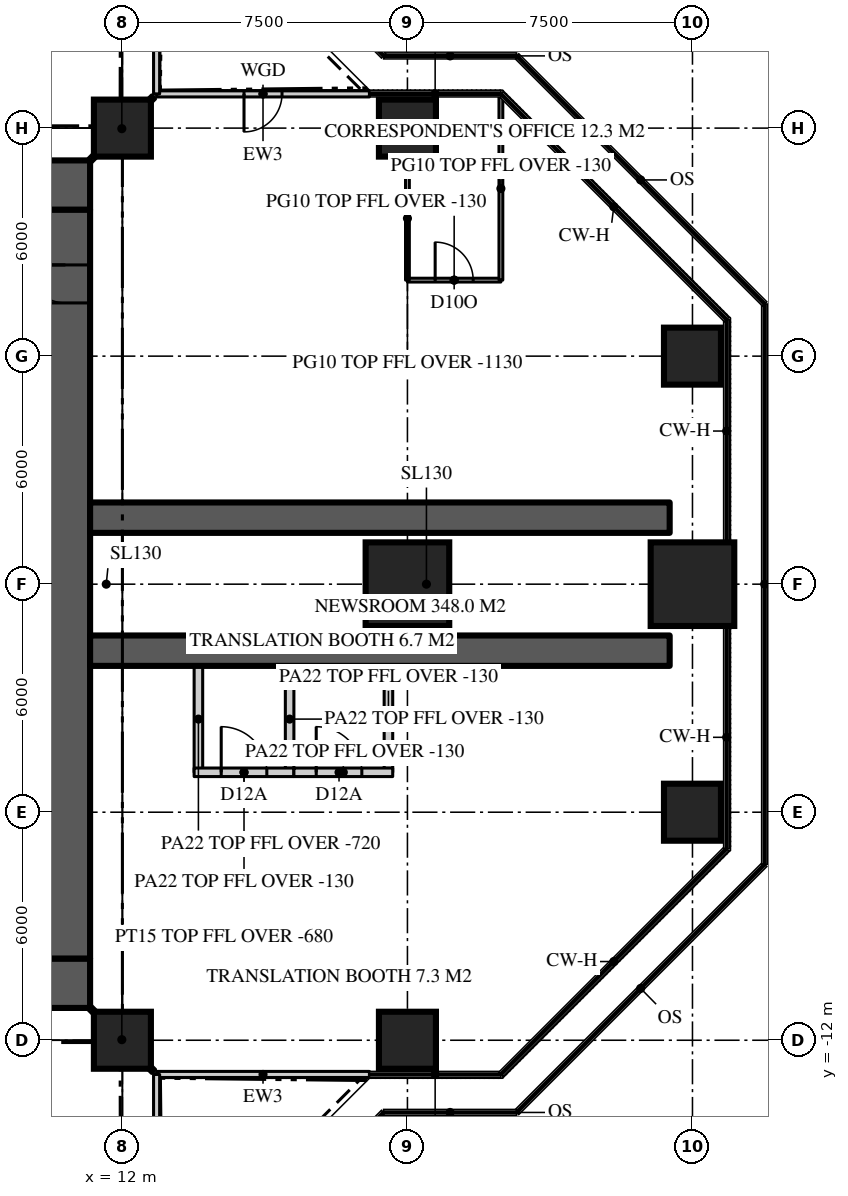
"""IFC4 building model, lengths in metres.
Left out: names, types, materials, properties, quantities, classifications, styles, units other than length and angle.
Written with IfcOpenShell. Run it as: python <this file> out.ifc"""

import sys

from ifc_helpers import new_model, si_unit, direction, frame, frame_2d, origin, origin_2d, place, context, subcontext, project, spatial, rectangle, extrude, element, fill, save


model = new_model("IFC4")
c1 = context("Model", 3, precision=1e-05, world=origin(), true_north=direction((0.0, 1.0)))
c2 = subcontext(c1, "Body", "Model", "MODEL_VIEW")
j1 = project(units=[si_unit("LENGTHUNIT", "METRE"), si_unit("PLANEANGLEUNIT", "RADIAN")], contexts=[c1])
p1 = place(None, origin())
s1 = spatial("IfcSite", under=j1, at=p1, CompositionType="ELEMENT")
p2 = place(p1, origin())
s2 = spatial("IfcBuilding", under=s1, at=p2, CompositionType="ELEMENT")
p3 = place(p2, frame((0.0, 0.0, 243.9)))
s3 = spatial("IfcBuildingStorey", under=s2, at=p3, CompositionType="ELEMENT", Elevation=243.9)
p4 = place(p3, frame((-11.15, 10.5, 0.0), z_axis=(0.0, 0.0, 1.0), x_axis=(1.0, 0.0, 0.0)))
e1 = element("IfcWall", 1, at=p4, inside=s3, PredefinedType="SHEAR", context=c2, shape_type="SweptSolid", body=[
    extrude(rectangle(XDim=22.3, YDim=1.3, at=frame_2d((11.15, 0.0))), origin(), (0.0, 0.0, 1.0), 3.9),
])
p5 = place(p4, frame((4.25, 0.0, 0.0)))
e2 = element("IfcOpeningElement", 2, at=p5, cuts=e1, PredefinedType="OPENING", context=c2, shape_type="SweptSolid", body=[
    extrude(rectangle(XDim=1.8, YDim=2.2, at=frame_2d((0.9, 1.1))), frame((0.0, 0.66, 0.0), z_axis=(0.0, -1.0, 0.0), x_axis=(1.0, 0.0, 0.0)), (0.0, 0.0, 1.0), 1.32),
])
p6 = place(p4, frame((16.25, 0.0, 0.0)))
e3 = element("IfcOpeningElement", 3, at=p6, cuts=e1, PredefinedType="OPENING", context=c2, shape_type="SweptSolid", body=[
    extrude(rectangle(XDim=1.8, YDim=2.2, at=frame_2d((0.9, 1.1))), frame((0.0, 0.66, 0.0), z_axis=(0.0, -1.0, 0.0), x_axis=(1.0, 0.0, 0.0)), (0.0, 0.0, 1.0), 1.32),
])
p7 = place(p3, frame((11.15, -10.5, 0.0), z_axis=(0.0, 0.0, 1.0), x_axis=(-1.0, 0.0, 0.0)))
e4 = element("IfcWall", 4, at=p7, inside=s3, PredefinedType="SHEAR", context=c2, shape_type="SweptSolid", body=[
    extrude(rectangle(XDim=22.3, YDim=1.3, at=frame_2d((11.15, 0.0))), origin(), (0.0, 0.0, 1.0), 3.9),
])
p8 = place(p7, frame((16.25, 0.0, 0.0)))
e5 = element("IfcOpeningElement", 5, at=p8, cuts=e4, PredefinedType="OPENING", context=c2, shape_type="SweptSolid", body=[
    extrude(rectangle(XDim=1.8, YDim=2.2, at=frame_2d((0.9, 1.1))), frame((0.0, 0.66, 0.0), z_axis=(0.0, -1.0, 0.0), x_axis=(1.0, 0.0, 0.0)), (0.0, 0.0, 1.0), 1.32),
])
p9 = place(p7, frame((4.25, 0.0, 0.0)))
e6 = element("IfcOpeningElement", 6, at=p9, cuts=e4, PredefinedType="OPENING", context=c2, shape_type="SweptSolid", body=[
    extrude(rectangle(XDim=1.8, YDim=2.2, at=frame_2d((0.9, 1.1))), frame((0.0, 0.66, 0.0), z_axis=(0.0, -1.0, 0.0), x_axis=(1.0, 0.0, 0.0)), (0.0, 0.0, 1.0), 1.32),
])
p10 = place(p3, frame((10.5, -9.85, 0.0), z_axis=(0.0, 0.0, 1.0), x_axis=(0.0, 1.0, 0.0)))
e7 = element("IfcWall", 7, at=p10, inside=s3, PredefinedType="SHEAR", context=c2, shape_type="SweptSolid", body=[
    extrude(rectangle(XDim=19.7, YDim=1.3, at=frame_2d((9.85, 0.0))), origin(), (0.0, 0.0, 1.0), 3.9),
])
p11 = place(p10, frame((17.25, 0.0, 0.0)))
e8 = element("IfcOpeningElement", 8, at=p11, cuts=e7, PredefinedType="OPENING", context=c2, shape_type="SweptSolid", body=[
    extrude(rectangle(XDim=1.0, YDim=2.2, at=frame_2d((0.5, 1.1))), frame((0.0, 0.66, 0.0), z_axis=(0.0, -1.0, 0.0), x_axis=(1.0, 0.0, 0.0)), (0.0, 0.0, 1.0), 1.32),
])
for number, where, z_axis, x_axis in (
    (9, (11.15, -1.75, 0.0), (0.0, 0.0, 1.0), (1.0, 0.0, 0.0)),
    (10, (11.15, 1.75, 0.0), (0.0, 0.0, 1.0), (1.0, 0.0, 0.0)),
):
    element("IfcWall", number, at=place(p3, frame(where, z_axis=z_axis, x_axis=x_axis)), inside=s3, PredefinedType="SHEAR", context=c2, shape_type="SweptSolid", body=[
        extrude(rectangle(XDim=15.25, YDim=0.8, at=frame_2d((7.625, 0.0))), origin(), (0.0, 0.0, 1.0), 3.9),
    ])
for number, where, z_axis, x_axis in (
    (11, (12.0, -12.0, 0.0), (0.0, 0.0, 1.0), (1.0, 0.0, 0.0)),
    (12, (19.5, -12.0, 0.0), (0.0, 0.0, 1.0), (1.0, 0.0, 0.0)),
    (13, (27.0, -6.0, 0.0), (0.0, 0.0, 1.0), (1.0, 0.0, 0.0)),
):
    element("IfcColumn", number, at=place(p3, frame(where, z_axis=z_axis, x_axis=x_axis)), inside=s3, PredefinedType="COLUMN", context=c2, shape_type="SweptSolid", body=[
        extrude(rectangle(XDim=1.5, YDim=1.5, at=origin_2d()), origin(), (0.0, 0.0, 1.0), 3.9),
    ])
for number, where, z_axis, x_axis in (
    (14, (19.5, 0.0, 0.0), (0.0, 0.0, 1.0), (1.0, 0.0, 0.0)),
    (15, (27.0, 0.0, 0.0), (0.0, 0.0, 1.0), (1.0, 0.0, 0.0)),
):
    element("IfcColumn", number, at=place(p3, frame(where, z_axis=z_axis, x_axis=x_axis)), inside=s3, PredefinedType="COLUMN", context=c2, shape_type="SweptSolid", body=[
        extrude(rectangle(XDim=2.2, YDim=2.2, at=origin_2d()), origin(), (0.0, 0.0, 1.0), 3.9),
    ])
for number, where, z_axis, x_axis in (
    (16, (27.0, 6.0, 0.0), (0.0, 0.0, 1.0), (1.0, 0.0, 0.0)),
    (17, (12.0, 12.0, 0.0), (0.0, 0.0, 1.0), (1.0, 0.0, 0.0)),
    (18, (19.5, 12.0, 0.0), (0.0, 0.0, 1.0), (1.0, 0.0, 0.0)),
):
    element("IfcColumn", number, at=place(p3, frame(where, z_axis=z_axis, x_axis=x_axis)), inside=s3, PredefinedType="COLUMN", context=c2, shape_type="SweptSolid", body=[
        extrude(rectangle(XDim=1.5, YDim=1.5, at=origin_2d()), origin(), (0.0, 0.0, 1.0), 3.9),
    ])
p12 = place(p3, frame((12.9, -12.9, 0.0), z_axis=(0.0, 0.0, 1.0), x_axis=(1.0, 0.0, 0.0)))
e19 = element("IfcWall", 19, at=p12, inside=s3, PredefinedType="SOLIDWALL", context=c2, shape_type="SweptSolid", body=[
    extrude(rectangle(XDim=5.6, YDim=0.16, at=frame_2d((2.8, 0.0))), origin(), (0.0, 0.0, 1.0), 3.77),
])
p13 = place(p3, frame((18.5, 12.9, 0.0), z_axis=(0.0, 0.0, 1.0), x_axis=(-1.0, 0.0, 0.0)))
e20 = element("IfcWall", 20, at=p13, inside=s3, PredefinedType="SOLIDWALL", context=c2, shape_type="SweptSolid", body=[
    extrude(rectangle(XDim=5.6, YDim=0.16, at=frame_2d((2.8, 0.0))), origin(), (0.0, 0.0, 1.0), 3.77),
])
p14 = place(p13, frame((2.3, 0.0, 0.0)))
e21 = element("IfcOpeningElement", 21, at=p14, cuts=e20, PredefinedType="OPENING", context=c2, shape_type="SweptSolid", body=[
    extrude(rectangle(XDim=1.0, YDim=2.2, at=frame_2d((0.5, 1.1))), frame((0.0, 0.09, 0.0), z_axis=(0.0, -1.0, 0.0), x_axis=(1.0, 0.0, 0.0)), (0.0, 0.0, 1.0), 0.18),
])
p15 = place(p3, frame((12.9, 12.9, 0.0), z_axis=(0.0, 0.0, 1.0), x_axis=(0.0, 1.0, 0.0)))
e22 = element("IfcWall", 22, at=p15, inside=s3, PredefinedType="SOLIDWALL", context=c2, shape_type="SweptSolid", body=[
    extrude(rectangle(XDim=5.6, YDim=0.16, at=frame_2d((2.8, 0.0))), origin(), (0.0, 0.0, 1.0), 3.77),
])
p16 = place(p3, frame((12.9, -18.5, 0.0), z_axis=(0.0, 0.0, 1.0), x_axis=(0.0, 1.0, 0.0)))
e23 = element("IfcWall", 23, at=p16, inside=s3, PredefinedType="SOLIDWALL", context=c2, shape_type="SweptSolid", body=[
    extrude(rectangle(XDim=5.6, YDim=0.16, at=frame_2d((2.8, 0.0))), origin(), (0.0, 0.0, 1.0), 3.77),
])
p17 = place(p16, frame((2.3, 0.0, 0.0)))
e24 = element("IfcOpeningElement", 24, at=p17, cuts=e23, PredefinedType="OPENING", context=c2, shape_type="SweptSolid", body=[
    extrude(rectangle(XDim=1.0, YDim=2.2, at=frame_2d((0.5, 1.1))), frame((0.0, 0.09, 0.0), z_axis=(0.0, -1.0, 0.0), x_axis=(1.0, 0.0, 0.0)), (0.0, 0.0, 1.0), 0.18),
])
p18 = place(p3, frame((19.5, 8.0, 0.0), z_axis=(0.0, 0.0, 1.0), x_axis=(1.0, 0.0, 0.0)))
e25 = element("IfcWall", 25, at=p18, inside=s3, PredefinedType="PARTITIONING", context=c2, shape_type="SweptSolid", body=[
    extrude(rectangle(XDim=2.459, YDim=0.1, at=frame_2d((1.229, 0.0))), origin(), (0.0, 0.0, 1.0), 3.77),
])
p19 = place(p18, frame((0.729, 0.0, 0.0)))
e26 = element("IfcOpeningElement", 26, at=p19, cuts=e25, PredefinedType="OPENING", context=c2, shape_type="SweptSolid", body=[
    extrude(rectangle(XDim=1.0, YDim=2.2, at=frame_2d((0.5, 1.1))), frame((0.0, 0.06, 0.0), z_axis=(0.0, -1.0, 0.0), x_axis=(1.0, 0.0, 0.0)), (0.0, 0.0, 1.0), 0.12),
])
p20 = place(p3, frame((19.5, 8.0, 0.0), z_axis=(0.0, 0.0, 1.0), x_axis=(0.0, 1.0, 0.0)))
e27 = element("IfcWall", 27, at=p20, inside=s3, PredefinedType="PARTITIONING", context=c2, shape_type="SweptSolid", body=[
    extrude(rectangle(XDim=3.25, YDim=0.1, at=frame_2d((1.625, 0.0))), origin(), (0.0, 0.0, 1.0), 2.77),
])
p21 = place(p3, frame((21.959, 8.0, 0.0), z_axis=(0.0, 0.0, 1.0), x_axis=(0.0, 1.0, 0.0)))
e28 = element("IfcWall", 28, at=p21, inside=s3, PredefinedType="PARTITIONING", context=c2, shape_type="SweptSolid", body=[
    extrude(rectangle(XDim=4.82, YDim=0.1, at=frame_2d((2.41, 0.0))), origin(), (0.0, 0.0, 1.0), 3.77),
])
p22 = place(p3, frame((14.0, -2.15, 0.0), z_axis=(0.0, 0.0, 1.0), x_axis=(0.0, -1.0, 0.0)))
e29 = element("IfcWall", 29, at=p22, inside=s3, PredefinedType="PARTITIONING", context=c2, shape_type="SweptSolid", body=[
    extrude(rectangle(XDim=2.8, YDim=0.225, at=frame_2d((1.4, 0.0))), origin(), (0.0, 0.0, 1.0), 3.18),
])
p23 = place(p3, frame((16.4, -2.15, 0.0), z_axis=(0.0, 0.0, 1.0), x_axis=(0.0, -1.0, 0.0)))
e30 = element("IfcWall", 30, at=p23, inside=s3, PredefinedType="PARTITIONING", context=c2, shape_type="SweptSolid", body=[
    extrude(rectangle(XDim=2.8, YDim=0.225, at=frame_2d((1.4, 0.0))), origin(), (0.0, 0.0, 1.0), 3.77),
])
p24 = place(p3, frame((13.887, -4.95, 0.0), z_axis=(0.0, 0.0, 1.0), x_axis=(1.0, 0.0, 0.0)))
e31 = element("IfcWall", 31, at=p24, inside=s3, PredefinedType="PARTITIONING", context=c2, shape_type="SweptSolid", body=[
    extrude(rectangle(XDim=2.625, YDim=0.225, at=frame_2d((1.312, 0.0))), origin(), (0.0, 0.0, 1.0), 3.77),
])
p25 = place(p24, frame((0.712, 0.0, 0.0)))
e32 = element("IfcOpeningElement", 32, at=p25, cuts=e31, PredefinedType="OPENING", context=c2, shape_type="SweptSolid", body=[
    extrude(rectangle(XDim=1.2, YDim=2.2, at=frame_2d((0.6, 1.1))), frame((0.0, 0.123, 0.0), z_axis=(0.0, -1.0, 0.0), x_axis=(1.0, 0.0, 0.0)), (0.0, 0.0, 1.0), 0.245),
])
p26 = place(p3, frame((19.0, -2.15, 0.0), z_axis=(0.0, 0.0, 1.0), x_axis=(0.0, -1.0, 0.0)))
e33 = element("IfcWall", 33, at=p26, inside=s3, PredefinedType="PARTITIONING", context=c2, shape_type="SweptSolid", body=[
    extrude(rectangle(XDim=2.8, YDim=0.225, at=frame_2d((1.4, 0.0))), origin(), (0.0, 0.0, 1.0), 3.77),
])
p27 = place(p3, frame((16.512, -4.95, 0.0), z_axis=(0.0, 0.0, 1.0), x_axis=(1.0, 0.0, 0.0)))
e34 = element("IfcWall", 34, at=p27, inside=s3, PredefinedType="PARTITIONING", context=c2, shape_type="SweptSolid", body=[
    extrude(rectangle(XDim=2.6, YDim=0.225, at=frame_2d((1.3, 0.0))), origin(), (0.0, 0.0, 1.0), 3.77),
])
p28 = place(p27, frame((0.587, 0.0, 0.0)))
e35 = element("IfcOpeningElement", 35, at=p28, cuts=e34, PredefinedType="OPENING", context=c2, shape_type="SweptSolid", body=[
    extrude(rectangle(XDim=1.2, YDim=2.2, at=frame_2d((0.6, 1.1))), frame((0.0, 0.123, 0.0), z_axis=(0.0, -1.0, 0.0), x_axis=(1.0, 0.0, 0.0)), (0.0, 0.0, 1.0), 0.245),
])
for number, where, z_axis, x_axis in (
    (36, (11.15, 11.15, 0.0), (0.0, 0.0, 1.0), (0.707, 0.707, 0.0)),
    (37, (11.15, -11.15, 0.0), (0.0, 0.0, 1.0), (0.707, -0.707, 0.0)),
):
    element("IfcWall", number, at=place(p3, frame(where, z_axis=z_axis, x_axis=x_axis)), inside=s3, PredefinedType="PARTITIONING", context=c2, shape_type="SweptSolid", body=[
        extrude(rectangle(XDim=2.362, YDim=0.15, at=frame_2d((1.181, 0.0))), origin(), (0.0, 0.0, 1.0), 3.22),
    ])
p29 = place(p14, origin())
e38 = element("IfcDoor", 38, at=p29, inside=s3, OperationType="SINGLE_SWING_RIGHT", PredefinedType="DOOR", context=c2, shape_type="SweptSolid", body=[
    extrude(rectangle(XDim=1.0, YDim=2.2, at=frame_2d((0.5, 1.1))), frame((0.0, 0.025, 0.0), z_axis=(0.0, -1.0, 0.0), x_axis=(1.0, 0.0, 0.0)), (0.0, 0.0, 1.0), 0.05),
])
fill(e21, e38)
p30 = place(p11, origin())
e39 = element("IfcDoor", 39, at=p30, inside=s3, OperationType="SINGLE_SWING_RIGHT", PredefinedType="DOOR", context=c2, shape_type="SweptSolid", body=[
    extrude(rectangle(XDim=1.0, YDim=2.2, at=frame_2d((0.5, 1.1))), frame((0.0, 0.025, 0.0), z_axis=(0.0, -1.0, 0.0), x_axis=(1.0, 0.0, 0.0)), (0.0, 0.0, 1.0), 0.05),
])
fill(e8, e39)
p31 = place(p19, origin())
e40 = element("IfcDoor", 40, at=p31, inside=s3, OperationType="SINGLE_SWING_LEFT", PredefinedType="DOOR", context=c2, shape_type="SweptSolid", body=[
    extrude(rectangle(XDim=1.0, YDim=2.2, at=frame_2d((0.5, 1.1))), frame((0.0, 0.025, 0.0), z_axis=(0.0, -1.0, 0.0), x_axis=(1.0, 0.0, 0.0)), (0.0, 0.0, 1.0), 0.05),
])
fill(e26, e40)
p32 = place(p25, origin())
e41 = element("IfcDoor", 41, at=p32, inside=s3, OperationType="SINGLE_SWING_LEFT", PredefinedType="DOOR", context=c2, shape_type="SweptSolid", body=[
    extrude(rectangle(XDim=1.2, YDim=2.2, at=frame_2d((0.6, 1.1))), frame((0.0, 0.025, 0.0), z_axis=(0.0, -1.0, 0.0), x_axis=(1.0, 0.0, 0.0)), (0.0, 0.0, 1.0), 0.05),
])
fill(e32, e41)
p33 = place(p28, origin())
e42 = element("IfcDoor", 42, at=p33, inside=s3, OperationType="SINGLE_SWING_LEFT", PredefinedType="DOOR", context=c2, shape_type="SweptSolid", body=[
    extrude(rectangle(XDim=1.2, YDim=2.2, at=frame_2d((0.6, 1.1))), frame((0.0, 0.025, 0.0), z_axis=(0.0, -1.0, 0.0), x_axis=(1.0, 0.0, 0.0)), (0.0, 0.0, 1.0), 0.05),
])
fill(e35, e42)
save(model, sys.argv[1])
